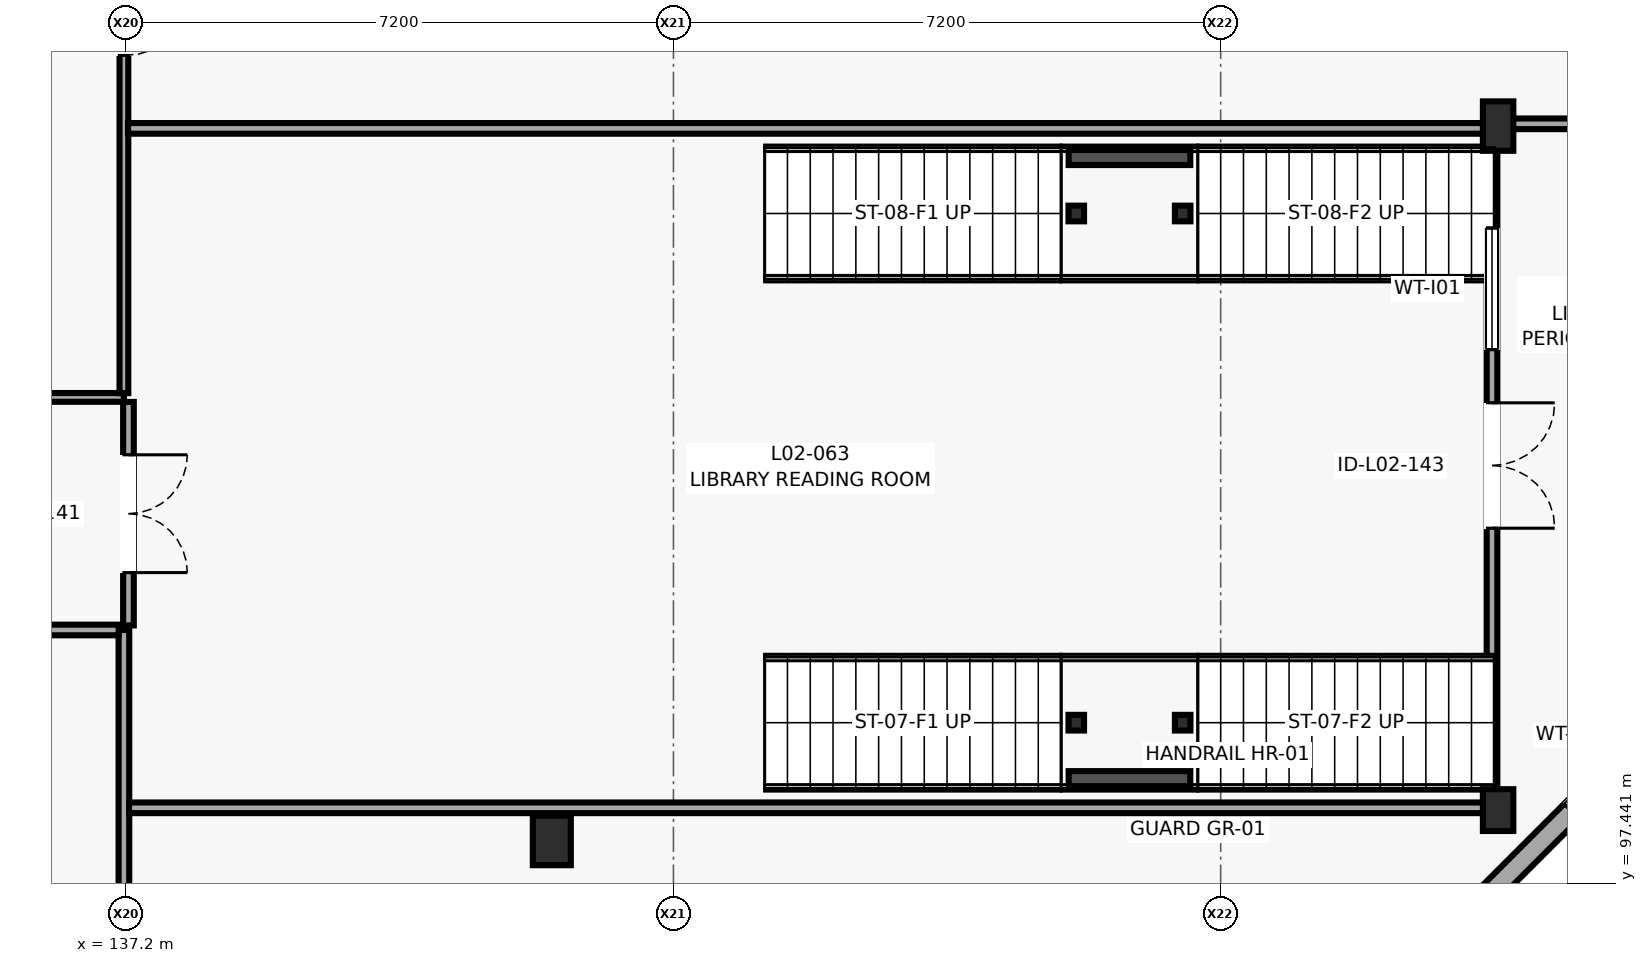
"""IFC4 building model, lengths in metres.
Left out: names, types, materials, properties, quantities, classifications, styles, units other than length and angle.
Written with IfcOpenShell. Run it as: python <this file> out.ifc"""

import sys

from ifc_helpers import new_model, si_unit, direction, frame, frame_2d, origin, origin_2d, place, context, subcontext, project, spatial, rectangle, i_section, extrude, element, fill, save


model = new_model("IFC4")
c1 = context("Model", 3, precision=1e-05, world=origin(), true_north=direction((0.0, 1.0)))
c2 = subcontext(c1, "Body", "Model", "MODEL_VIEW")
j1 = project(units=[si_unit("LENGTHUNIT", "METRE"), si_unit("PLANEANGLEUNIT", "RADIAN")], contexts=[c1])
p1 = place(None, origin())
s1 = spatial("IfcSite", under=j1, at=p1, CompositionType="ELEMENT")
p2 = place(p1, origin())
s2 = spatial("IfcBuilding", under=s1, at=p2, CompositionType="ELEMENT")
p3 = place(p2, frame((0.0, 0.0, 8.2)))
s3 = spatial("IfcBuildingStorey", under=s2, at=p3, CompositionType="ELEMENT", Elevation=8.2)
p4 = place(p3, frame((142.8, 98.0, 0.0), z_axis=(0.0, 0.0, 1.0), x_axis=(1.0, 0.0, 0.0)))
e1 = element("IfcColumn", 1, at=p4, inside=s3, PredefinedType="COLUMN", context=c2, shape_type="SweptSolid", body=[
    extrude(rectangle(XDim=0.5, YDim=0.65, at=origin_2d()), origin(), (0.0, 0.0, 1.0), 4.0),
])
p5 = place(p3, frame((155.25, 98.4, 0.0), z_axis=(0.0, 0.0, 1.0), x_axis=(1.0, 0.0, 0.0)))
e2 = element("IfcColumn", 2, at=p5, inside=s3, PredefinedType="COLUMN", context=c2, shape_type="SweptSolid", body=[
    extrude(rectangle(XDim=0.4, YDim=0.55, at=origin_2d()), origin(), (0.0, 0.0, 1.0), 4.0),
])
p6 = place(p3, frame((155.25, 107.4, 0.0), z_axis=(0.0, 0.0, 1.0), x_axis=(1.0, 0.0, 0.0)))
e3 = element("IfcColumn", 3, at=p6, inside=s3, PredefinedType="COLUMN", context=c2, shape_type="SweptSolid", body=[
    extrude(rectangle(XDim=0.4, YDim=0.65, at=origin_2d()), origin(), (0.0, 0.0, 1.0), 4.0),
])
p7 = place(p3, frame((154.419, 96.584, 0.0), z_axis=(0.0, 0.0, 1.0), x_axis=(0.707106781187, 0.707106781187, 0.0)))
e4 = element("IfcWall", 4, at=p7, inside=s3, PredefinedType="SOLIDWALL", context=c2, shape_type="SweptSolid", body=[
    extrude(rectangle(XDim=5.936, YDim=0.28, at=frame_2d((2.968, 0.0))), origin(), (0.0, 0.0, 1.0), 3.78),
])
p8 = place(p7, frame((2.543, 0.0, 0.75)))
e5 = element("IfcOpeningElement", 5, at=p8, cuts=e4, PredefinedType="OPENING", context=c2, shape_type="SweptSolid", body=[
    extrude(rectangle(XDim=1.75, YDim=2.05, at=frame_2d((0.875, 1.025))), frame((0.0, 0.15, 0.0), z_axis=(0.0, -1.0, 0.0), x_axis=(1.0, 0.0, 0.0)), (0.0, 0.0, 1.0), 0.3),
])
p9 = place(p3, frame((158.616, 107.619, 0.0), z_axis=(0.0, 0.0, 1.0), x_axis=(-0.707106781187, 0.707106781187, 0.0)))
e6 = element("IfcWall", 6, at=p9, inside=s3, PredefinedType="SOLIDWALL", context=c2, shape_type="SweptSolid", body=[
    extrude(rectangle(XDim=5.936, YDim=0.28, at=frame_2d((2.968, 0.0))), origin(), (0.0, 0.0, 1.0), 3.78),
])
p10 = place(p9, frame((1.918, 0.0, 0.85)))
e7 = element("IfcOpeningElement", 7, at=p10, cuts=e6, PredefinedType="OPENING", context=c2, shape_type="SweptSolid", body=[
    extrude(rectangle(XDim=2.1, YDim=1.8, at=frame_2d((1.05, 0.9))), frame((0.0, 0.15, 0.0), z_axis=(0.0, -1.0, 0.0), x_axis=(1.0, 0.0, 0.0)), (0.0, 0.0, 1.0), 0.3),
])
for number, where, z_axis, x_axis in (
    (8, (149.7, 99.55, 0.0), (0.0, 0.0, 1.0), (1.0, 0.0, 0.0)),
    (9, (151.1, 99.55, 0.0), (0.0, 0.0, 1.0), (1.0, 0.0, 0.0)),
):
    element("IfcColumn", number, at=place(p3, frame(where, z_axis=z_axis, x_axis=x_axis)), inside=s3, PredefinedType="COLUMN", context=c2, shape_type="SweptSolid", body=[
        extrude(i_section(OverallWidth=0.204, OverallDepth=0.206, WebThickness=0.008, FlangeThickness=0.012, FilletRadius=0.01, at=origin_2d()), origin(), (0.0, 0.0, 1.0), 1.81),
    ])
p11 = place(p3, frame((149.6, 98.8, 0.0), z_axis=(0.0, 0.0, 1.0), x_axis=(1.0, 0.0, 0.0)))
e10 = element("IfcWall", 10, at=p11, inside=s3, PredefinedType="SHEAR", context=c2, shape_type="SweptSolid", body=[
    extrude(rectangle(XDim=1.6, YDim=0.225, at=frame_2d((0.8, 0.0))), origin(), (0.0, 0.0, 1.0), 1.81),
])
for number, where, z_axis, x_axis in (
    (11, (149.7, 106.25, 0.0), (0.0, 0.0, 1.0), (1.0, 0.0, 0.0)),
    (12, (151.1, 106.25, 0.0), (0.0, 0.0, 1.0), (1.0, 0.0, 0.0)),
):
    element("IfcColumn", number, at=place(p3, frame(where, z_axis=z_axis, x_axis=x_axis)), inside=s3, PredefinedType="COLUMN", context=c2, shape_type="SweptSolid", body=[
        extrude(i_section(OverallWidth=0.204, OverallDepth=0.206, WebThickness=0.008, FlangeThickness=0.012, FilletRadius=0.01, at=origin_2d()), origin(), (0.0, 0.0, 1.0), 1.81),
    ])
p12 = place(p3, frame((149.6, 107.0, 0.0), z_axis=(0.0, 0.0, 1.0), x_axis=(1.0, 0.0, 0.0)))
e13 = element("IfcWall", 13, at=p12, inside=s3, PredefinedType="SHEAR", context=c2, shape_type="SweptSolid", body=[
    extrude(rectangle(XDim=1.6, YDim=0.225, at=frame_2d((0.8, 0.0))), origin(), (0.0, 0.0, 1.0), 1.81),
])
p13 = place(p3, frame((137.17, 96.678, 0.0), z_axis=(0.0, 0.0, 1.0), x_axis=(0.0, 1.0, 0.0)))
e14 = element("IfcWall", 14, at=p13, inside=s3, PredefinedType="PARTITIONING", context=c2, shape_type="SweptSolid", body=[
    extrude(rectangle(XDim=4.092, YDim=0.14, at=frame_2d((2.046, 0.0))), origin(), (0.0, 0.0, 1.0), 3.115),
])
p14 = place(p3, frame((137.102, 100.77, 0.0), z_axis=(0.0, 0.0, 1.0), x_axis=(-1.0, 0.0, 0.0)))
e15 = element("IfcWall", 15, at=p14, inside=s3, PredefinedType="PARTITIONING", context=c2, shape_type="SweptSolid", body=[
    extrude(rectangle(XDim=14.259, YDim=0.14, at=frame_2d((7.129, 0.0))), origin(), (0.0, 0.0, 1.0), 3.715),
])
p15 = place(p14, frame((6.569, 0.0, 0.0)))
e16 = element("IfcOpeningElement", 16, at=p15, cuts=e15, PredefinedType="OPENING", context=c2, shape_type="SweptSolid", body=[
    extrude(rectangle(XDim=1.12, YDim=2.18, at=frame_2d((0.56, 1.09))), frame((0.0, 0.08, 0.0), z_axis=(0.0, -1.0, 0.0), x_axis=(1.0, 0.0, 0.0)), (0.0, 0.0, 1.0), 0.16),
])
p16 = place(p14, frame((8.389, 0.0, 1.05)))
e17 = element("IfcOpeningElement", 17, at=p16, cuts=e15, PredefinedType="OPENING", context=c2, shape_type="SweptSolid", body=[
    extrude(rectangle(XDim=1.4, YDim=1.05, at=frame_2d((0.7, 0.525))), frame((0.0, 0.08, 0.0), z_axis=(0.0, -1.0, 0.0), x_axis=(1.0, 0.0, 0.0)), (0.0, 0.0, 1.0), 0.16),
])
p17 = place(p3, frame((130.83, 103.83, 0.0), z_axis=(0.0, 0.0, 1.0), x_axis=(1.0, 0.0, 0.0)))
e18 = element("IfcWall", 18, at=p17, inside=s3, PredefinedType="PARTITIONING", context=c2, shape_type="SweptSolid", body=[
    extrude(rectangle(XDim=6.34, YDim=0.115, at=frame_2d((3.17, 0.0))), origin(), (0.0, 0.0, 1.0), 3.715),
])
p18 = place(p17, frame((2.695, 0.0, 0.0)))
e19 = element("IfcOpeningElement", 19, at=p18, cuts=e18, PredefinedType="OPENING", context=c2, shape_type="SweptSolid", body=[
    extrude(rectangle(XDim=0.95, YDim=2.05, at=frame_2d((0.475, 1.025))), frame((0.0, 0.067, 0.0), z_axis=(0.0, -1.0, 0.0), x_axis=(1.0, 0.0, 0.0)), (0.0, 0.0, 1.0), 0.135),
])
p19 = place(p3, frame((137.17, 103.886, 0.0), z_axis=(0.0, 0.0, 1.0), x_axis=(0.0, 1.0, 0.0)))
e20 = element("IfcWall", 20, at=p19, inside=s3, PredefinedType="PARTITIONING", context=c2, shape_type="SweptSolid", body=[
    extrude(rectangle(XDim=7.836, YDim=0.115, at=frame_2d((3.918, 0.0))), origin(), (0.0, 0.0, 1.0), 3.115),
])
p20 = place(p19, frame((4.443, 0.0, 0.0)))
e21 = element("IfcOpeningElement", 21, at=p20, cuts=e20, PredefinedType="OPENING", context=c2, shape_type="SweptSolid", body=[
    extrude(rectangle(XDim=1.0, YDim=2.1, at=frame_2d((0.5, 1.05))), frame((0.0, 0.067, 0.0), z_axis=(0.0, -1.0, 0.0), x_axis=(1.0, 0.0, 0.0)), (0.0, 0.0, 1.0), 0.135),
])
p21 = place(p3, frame((137.238, 98.43, 0.0), z_axis=(0.0, 0.0, 1.0), x_axis=(1.0, 0.0, 0.0)))
e22 = element("IfcWall", 22, at=p21, inside=s3, PredefinedType="PARTITIONING", context=c2, shape_type="SweptSolid", body=[
    extrude(rectangle(XDim=17.932, YDim=0.14, at=frame_2d((8.966, 0.0))), origin(), (0.0, 0.0, 1.0), 3.78),
])
p22 = place(p3, frame((155.17, 98.498, 0.0), z_axis=(0.0, 0.0, 1.0), x_axis=(0.0, 1.0, 0.0)))
e23 = element("IfcWall", 23, at=p22, inside=s3, PredefinedType="PARTITIONING", context=c2, shape_type="SweptSolid", body=[
    extrude(rectangle(XDim=8.872, YDim=0.14, at=frame_2d((4.436, 0.0))), origin(), (0.0, 0.0, 1.0), 3.165),
])
p23 = place(p22, frame((3.611, 0.0, 0.0)))
e24 = element("IfcOpeningElement", 24, at=p23, cuts=e23, PredefinedType="OPENING", context=c2, shape_type="SweptSolid", body=[
    extrude(rectangle(XDim=1.65, YDim=2.32, at=frame_2d((0.825, 1.16))), frame((0.0, 0.08, 0.0), z_axis=(0.0, -1.0, 0.0), x_axis=(1.0, 0.0, 0.0)), (0.0, 0.0, 1.0), 0.16),
])
p24 = place(p22, frame((5.961, 0.0, 1.05)))
e25 = element("IfcOpeningElement", 25, at=p24, cuts=e23, PredefinedType="OPENING", context=c2, shape_type="SweptSolid", body=[
    extrude(rectangle(XDim=1.6, YDim=1.1, at=frame_2d((0.8, 0.55))), frame((0.0, 0.08, 0.0), z_axis=(0.0, -1.0, 0.0), x_axis=(1.0, 0.0, 0.0)), (0.0, 0.0, 1.0), 0.16),
])
p25 = place(p3, frame((155.102, 107.37, 0.0), z_axis=(0.0, 0.0, 1.0), x_axis=(-1.0, 0.0, 0.0)))
e26 = element("IfcWall", 26, at=p25, inside=s3, PredefinedType="PARTITIONING", context=c2, shape_type="SweptSolid", body=[
    extrude(rectangle(XDim=17.877, YDim=0.14, at=frame_2d((8.938, 0.0))), origin(), (0.0, 0.0, 1.0), 3.78),
])
p26 = place(p3, frame((137.23, 103.77, 0.0), z_axis=(0.0, 0.0, 1.0), x_axis=(0.0, -1.0, 0.0)))
e27 = element("IfcWall", 27, at=p26, inside=s3, PredefinedType="PARTITIONING", context=c2, shape_type="SweptSolid", body=[
    extrude(rectangle(XDim=2.94, YDim=0.14, at=frame_2d((1.47, 0.0))), origin(), (0.0, 0.0, 1.0), 3.115),
])
p27 = place(p26, frame((0.695, 0.0, 0.0)))
e28 = element("IfcOpeningElement", 28, at=p27, cuts=e27, PredefinedType="OPENING", context=c2, shape_type="SweptSolid", body=[
    extrude(rectangle(XDim=1.55, YDim=2.3, at=frame_2d((0.775, 1.15))), frame((0.0, 0.08, 0.0), z_axis=(0.0, -1.0, 0.0), x_axis=(1.0, 0.0, 0.0)), (0.0, 0.0, 1.0), 0.16),
])
p28 = place(p3, frame((155.17, 107.43, 0.0), z_axis=(0.0, 0.0, 1.0), x_axis=(1.0, 0.0, 0.0)))
e29 = element("IfcWall", 29, at=p28, inside=s3, PredefinedType="PARTITIONING", context=c2, shape_type="SweptSolid", body=[
    extrude(rectangle(XDim=3.352, YDim=0.14, at=frame_2d((1.676, 0.0))), origin(), (0.0, 0.0, 1.0), 3.715),
])
p29 = place(p27, origin())
e30 = element("IfcDoor", 30, at=p29, inside=s3, OperationType="DOUBLE_DOOR_SINGLE_SWING", PredefinedType="DOOR", context=c2, shape_type="SweptSolid", body=[
    extrude(rectangle(XDim=1.55, YDim=2.3, at=frame_2d((0.775, 1.15))), frame((0.0, 0.025, 0.0), z_axis=(0.0, -1.0, 0.0), x_axis=(1.0, 0.0, 0.0)), (0.0, 0.0, 1.0), 0.05),
])
fill(e28, e30)
p30 = place(p20, frame((1.0, 0.0, 0.0), z_axis=(0.0, 0.0, 1.0), x_axis=(-1.0, 0.0, 0.0)))
e31 = element("IfcDoor", 31, at=p30, inside=s3, OperationType="SINGLE_SWING_RIGHT", PredefinedType="DOOR", context=c2, shape_type="SweptSolid", body=[
    extrude(rectangle(XDim=1.0, YDim=2.1, at=frame_2d((0.5, 1.05))), frame((0.0, 0.025, 0.0), z_axis=(0.0, -1.0, 0.0), x_axis=(1.0, 0.0, 0.0)), (0.0, 0.0, 1.0), 0.05),
])
fill(e21, e31)
p31 = place(p23, frame((1.65, 0.0, 0.0), z_axis=(0.0, 0.0, 1.0), x_axis=(-1.0, 0.0, 0.0)))
e32 = element("IfcDoor", 32, at=p31, inside=s3, OperationType="DOUBLE_DOOR_SINGLE_SWING", PredefinedType="DOOR", context=c2, shape_type="SweptSolid", body=[
    extrude(rectangle(XDim=1.65, YDim=2.32, at=frame_2d((0.825, 1.16))), frame((0.0, 0.025, 0.0), z_axis=(0.0, -1.0, 0.0), x_axis=(1.0, 0.0, 0.0)), (0.0, 0.0, 1.0), 0.05),
])
fill(e24, e32)
p32 = place(p24, origin())
e33 = element("IfcWindow", 33, at=p32, inside=s3, PartitioningType="SINGLE_PANEL", PredefinedType="WINDOW", context=c2, shape_type="SweptSolid", body=[
    extrude(rectangle(XDim=1.6, YDim=1.1, at=frame_2d((0.8, 0.55))), frame((0.0, 0.03, 0.0), z_axis=(0.0, -1.0, 0.0), x_axis=(1.0, 0.0, 0.0)), (0.0, 0.0, 1.0), 0.06),
])
fill(e25, e33)
save(model, sys.argv[1])
